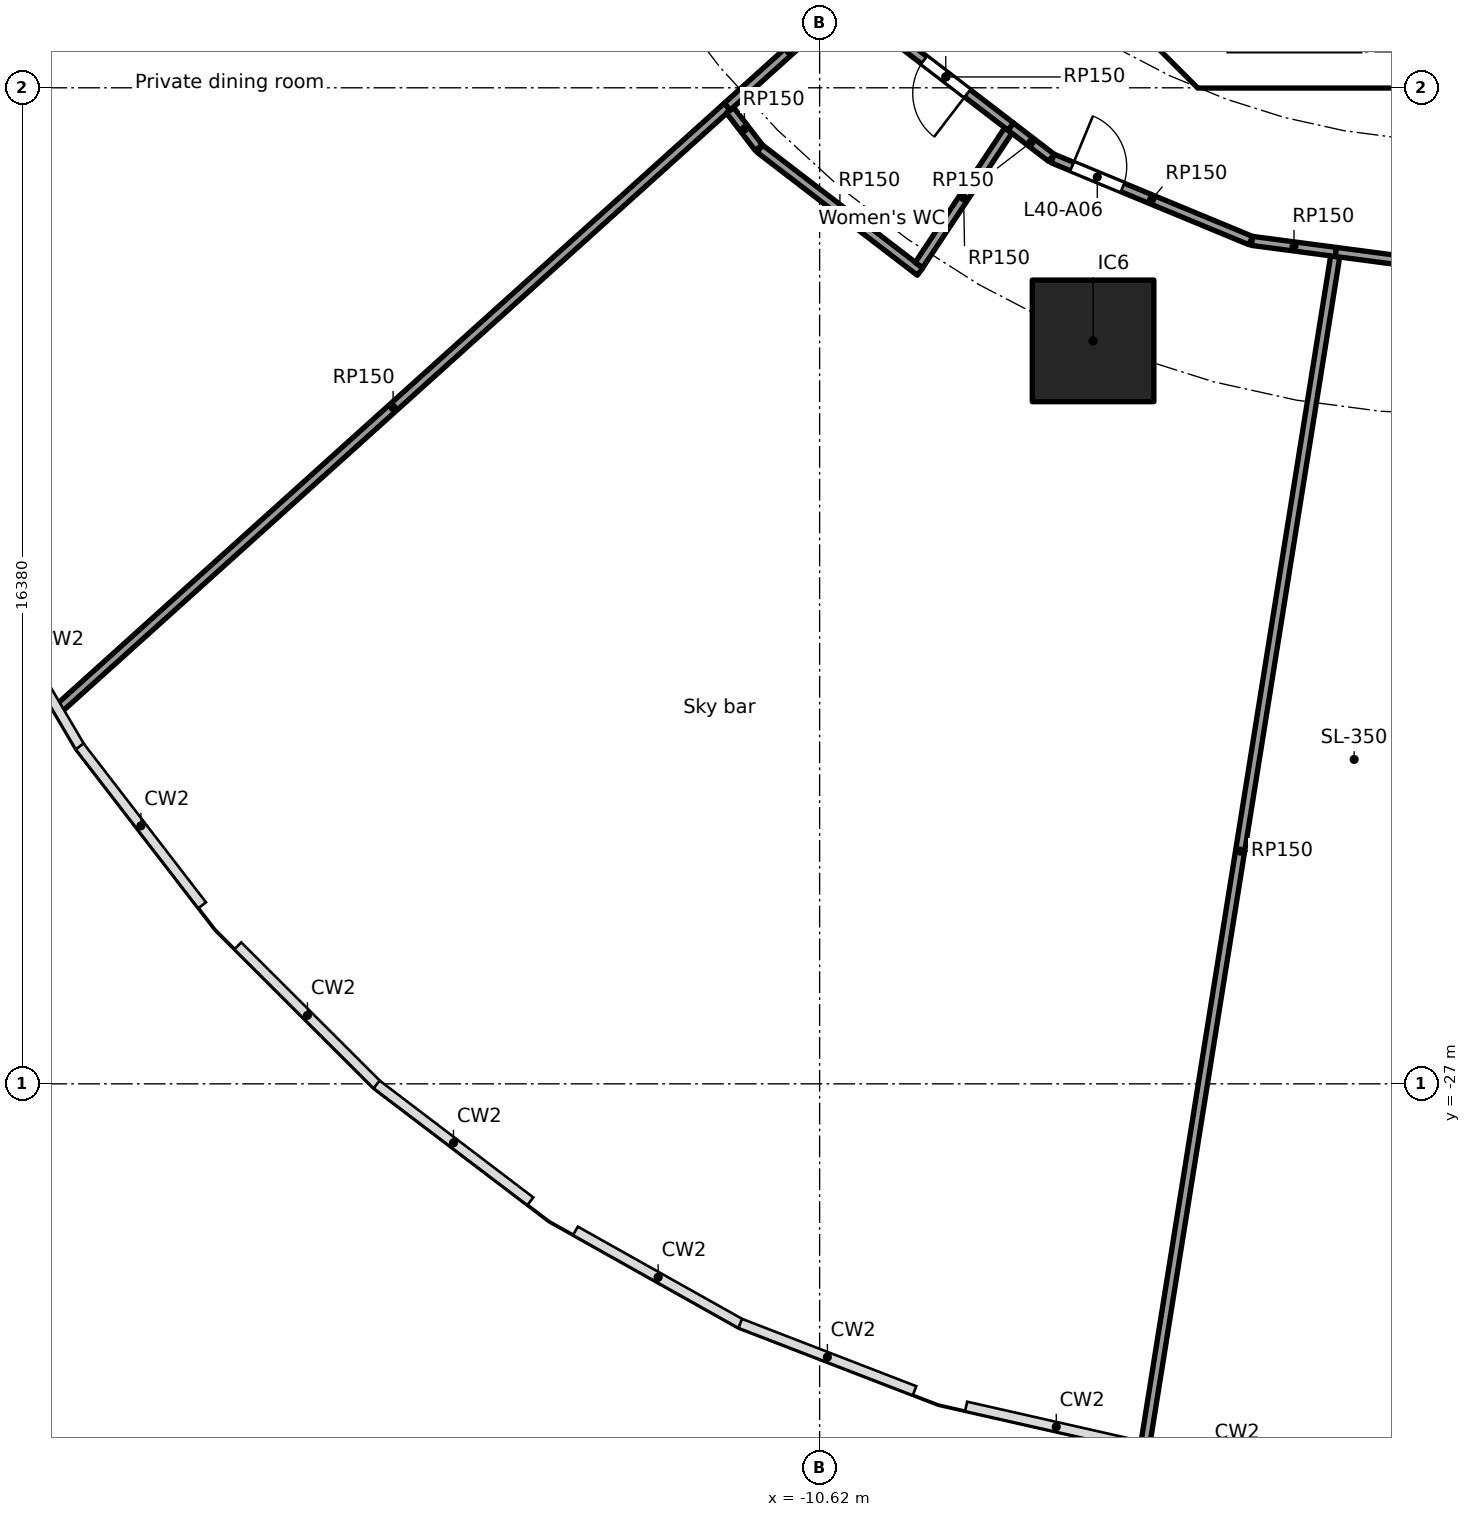
"""IFC4 building model, lengths in metres.
Left out: names, types, materials, properties, quantities, classifications, styles, units other than length and angle.
Written with IfcOpenShell. Run it as: python <this file> out.ifc"""

import sys

from ifc_helpers import new_model, si_unit, direction, frame, frame_2d, origin, origin_2d, place, context, subcontext, project, spatial, polyline, rectangle, outline, extrude, element, fill, save


model = new_model("IFC4")
c1 = context("Model", 3, precision=1e-05, world=origin(), true_north=direction((0.0, 1.0)))
c2 = subcontext(c1, "Body", "Model", "MODEL_VIEW")
j1 = project(units=[si_unit("LENGTHUNIT", "METRE"), si_unit("PLANEANGLEUNIT", "RADIAN")], contexts=[c1])
p1 = place(None, origin())
s1 = spatial("IfcSite", under=j1, at=p1, CompositionType="ELEMENT")
p2 = place(p1, origin())
s2 = spatial("IfcBuilding", under=s1, at=p2, CompositionType="ELEMENT")
p3 = place(p2, frame((0.0, 0.0, 160.3)))
s3 = spatial("IfcBuildingStorey", under=s2, at=p3, CompositionType="ELEMENT", Elevation=160.3)
p4 = place(p3, frame((-6.123, -14.782, 0.0), z_axis=(0.0, 0.0, 1.0), x_axis=(1.0, 0.0, 0.0)))
e1 = element("IfcColumn", 1, at=p4, inside=s3, PredefinedType="COLUMN", context=c2, shape_type="SweptSolid", body=[
    extrude(rectangle(XDim=2.0, YDim=2.0, at=origin_2d()), origin(), (0.0, 0.0, 1.0), 5.6),
])
p5 = place(p3, frame((-9.988, -4.613, 0.0), z_axis=(0.0, 0.0, 1.0), x_axis=(0.707106781187, -0.707106781187, 0.0)))
e2 = element("IfcWall", 2, at=p5, inside=s3, PredefinedType="SHEAR", context=c2, shape_type="SweptSolid", body=[
    extrude(rectangle(XDim=7.602, YDim=0.6, at=frame_2d((3.801, 0.0))), origin(), (0.0, 0.0, 1.0), 5.34),
])
p6 = place(p5, frame((6.151, 0.0, 0.0)))
e3 = element("IfcOpeningElement", 3, at=p6, cuts=e2, PredefinedType="OPENING", context=c2, shape_type="SweptSolid", body=[
    extrude(rectangle(XDim=1.1, YDim=2.1, at=frame_2d((0.55, 1.05))), frame((0.0, 0.31, 0.0), z_axis=(0.0, -1.0, 0.0), x_axis=(1.0, 0.0, 0.0)), (0.0, 0.0, 1.0), 0.62),
])
p7 = place(p3, origin())
e4 = element("IfcWall", 4, at=p7, inside=s3, PredefinedType="SHEAR", context=c2, shape_type="SweptSolid", body=[
    extrude(outline(polyline([(-4.152, -10.025), (4.152, -10.025), (4.401, -9.776), (4.825, -10.2), (4.401, -10.625), (-4.401, -10.625), (-4.825, -10.2), (-4.401, -9.776), (-4.152, -10.025)])), origin(), (0.0, 0.0, 1.0), 5.34),
])
p8 = place(p3, frame((-12.138, -10.93, 0.0), z_axis=(0.0, 0.0, 1.0), x_axis=(-0.743151323341, -0.66912338968, 0.0)))
e5 = element("IfcWall", 5, at=p8, inside=s3, PredefinedType="PARTITIONING", context=c2, shape_type="SweptSolid", body=[
    extrude(rectangle(XDim=14.791, YDim=0.15, at=frame_2d((7.396, 0.0))), origin(), (0.0, 0.0, 1.0), 5.34),
])
p9 = place(p3, frame((-11.621, -11.604, 0.0), z_axis=(0.0, 0.0, 1.0), x_axis=(-0.608781909099, 0.793337624945, 0.0)))
e6 = element("IfcWall", 6, at=p9, inside=s3, PredefinedType="PARTITIONING", context=c2, shape_type="SweptSolid", body=[
    extrude(rectangle(XDim=0.775, YDim=0.15, at=frame_2d((0.388, 0.0))), origin(), (0.0, 0.0, 1.0), 5.34),
])
p10 = place(p3, frame((-10.107, -9.101, 0.0), z_axis=(0.0, 0.0, 1.0), x_axis=(-0.743116473198, -0.669162093414, 0.0)))
e7 = element("IfcWall", 7, at=p10, inside=s3, PredefinedType="PARTITIONING", context=c2, shape_type="SweptSolid", body=[
    extrude(rectangle(XDim=2.733, YDim=0.15, at=frame_2d((1.367, 0.0))), origin(), (0.0, 0.0, 1.0), 5.34),
])
p11 = place(p3, frame((-8.968, -13.644, 0.0), z_axis=(0.0, 0.0, 1.0), x_axis=(-0.79334728927, 0.608769314772, 0.0)))
e8 = element("IfcWall", 8, at=p11, inside=s3, PredefinedType="PARTITIONING", context=c2, shape_type="SweptSolid", body=[
    extrude(rectangle(XDim=3.323, YDim=0.15, at=frame_2d((1.661, 0.0))), origin(), (0.0, 0.0, 1.0), 5.34),
])
p12 = place(p3, frame((-7.476, -11.26, 0.0), z_axis=(0.0, 0.0, 1.0), x_axis=(-0.793376684251, 0.60873100536, 0.0)))
e9 = element("IfcWall", 9, at=p12, inside=s3, PredefinedType="PARTITIONING", context=c2, shape_type="SweptSolid", body=[
    extrude(rectangle(XDim=2.687, YDim=0.15, at=frame_2d((1.343, 0.0))), origin(), (0.0, 0.0, 1.0), 5.34),
])
p13 = place(p12, frame((0.899, 0.0, 0.0)))
e10 = element("IfcOpeningElement", 10, at=p13, cuts=e9, PredefinedType="OPENING", context=c2, shape_type="SweptSolid", body=[
    extrude(rectangle(XDim=0.9, YDim=2.1, at=frame_2d((0.45, 1.05))), frame((0.0, 0.085, 0.0), z_axis=(0.0, -1.0, 0.0), x_axis=(1.0, 0.0, 0.0)), (0.0, 0.0, 1.0), 0.17),
])
p14 = place(p3, frame((-7.517, -11.322, 0.0), z_axis=(0.0, 0.0, 1.0), x_axis=(-0.553129626005, -0.833095202744, 0.0)))
e11 = element("IfcWall", 11, at=p14, inside=s3, PredefinedType="PARTITIONING", context=c2, shape_type="SweptSolid", body=[
    extrude(rectangle(XDim=2.656, YDim=0.15, at=frame_2d((1.328, 0.0))), origin(), (0.0, 0.0, 1.0), 5.34),
])
p15 = place(p3, frame((-6.809, -11.771, 0.0), z_axis=(0.0, 0.0, 1.0), x_axis=(-0.793358303575, 0.608754960677, 0.0)))
e12 = element("IfcWall", 12, at=p15, inside=s3, PredefinedType="PARTITIONING", context=c2, shape_type="SweptSolid", body=[
    extrude(rectangle(XDim=0.84, YDim=0.15, at=frame_2d((0.42, 0.0))), origin(), (0.0, 0.0, 1.0), 5.34),
])
p16 = place(p3, frame((-3.531, -13.132, 0.0), z_axis=(0.0, 0.0, 1.0), x_axis=(-0.923881838111, 0.382677866108, 0.0)))
e13 = element("IfcWall", 13, at=p16, inside=s3, PredefinedType="PARTITIONING", context=c2, shape_type="SweptSolid", body=[
    extrude(rectangle(XDim=3.527, YDim=0.15, at=frame_2d((1.763, 0.0))), origin(), (0.0, 0.0, 1.0), 5.34),
])
p17 = place(p16, frame((2.281, 0.0, 0.0)))
e14 = element("IfcOpeningElement", 14, at=p17, cuts=e13, PredefinedType="OPENING", context=c2, shape_type="SweptSolid", body=[
    extrude(rectangle(XDim=0.9, YDim=2.1, at=frame_2d((0.45, 1.05))), frame((0.0, 0.085, 0.0), z_axis=(0.0, -1.0, 0.0), x_axis=(1.0, 0.0, 0.0)), (0.0, 0.0, 1.0), 0.17),
])
p18 = place(p3, frame((-2.142, -13.394, 0.0), z_axis=(0.0, 0.0, 1.0), x_axis=(-0.157896749687, -0.987455627579, 0.0)))
e15 = element("IfcWall", 15, at=p18, inside=s3, PredefinedType="PARTITIONING", context=c2, shape_type="SweptSolid", body=[
    extrude(rectangle(XDim=19.805, YDim=0.15, at=frame_2d((9.903, 0.0))), origin(), (0.0, 0.0, 1.0), 5.34),
])
p19 = place(p3, frame((-2.13, -13.32, 0.0), z_axis=(0.0, 0.0, 1.0), x_axis=(-0.991448914516, 0.130495401857, 0.0)))
e16 = element("IfcWall", 16, at=p19, inside=s3, PredefinedType="PARTITIONING", context=c2, shape_type="SweptSolid", body=[
    extrude(rectangle(XDim=1.39, YDim=0.15, at=frame_2d((0.695, 0.0))), origin(), (0.0, 0.0, 1.0), 5.34),
])
p20 = place(p3, frame((-0.012, -13.598, 0.0), z_axis=(0.0, 0.0, 1.0), x_axis=(-0.991448071145, 0.130501809272, 0.0)))
e17 = element("IfcWall", 17, at=p20, inside=s3, PredefinedType="PARTITIONING", context=c2, shape_type="SweptSolid", body=[
    extrude(rectangle(XDim=2.136, YDim=0.15, at=frame_2d((1.068, 0.0))), origin(), (0.0, 0.0, 1.0), 5.34),
])
p21 = place(p13, origin())
e18 = element("IfcDoor", 18, at=p21, inside=s3, OperationType="SINGLE_SWING_LEFT", PredefinedType="DOOR", context=c2, shape_type="SweptSolid", body=[
    extrude(rectangle(XDim=0.9, YDim=2.1, at=frame_2d((0.45, 1.05))), frame((0.0, 0.025, 0.0), z_axis=(0.0, -1.0, 0.0), x_axis=(1.0, 0.0, 0.0)), (0.0, 0.0, 1.0), 0.05),
])
fill(e10, e18)
p22 = place(p17, frame((0.9, 0.0, 0.0), x_axis=(-1.0, 0.0, 0.0)))
e19 = element("IfcDoor", 19, at=p22, inside=s3, OperationType="SINGLE_SWING_LEFT", PredefinedType="DOOR", context=c2, shape_type="SweptSolid", body=[
    extrude(rectangle(XDim=0.9, YDim=2.1, at=frame_2d((0.45, 1.05))), frame((0.0, 0.025, 0.0), z_axis=(0.0, -1.0, 0.0), x_axis=(1.0, 0.0, 0.0)), (0.0, 0.0, 1.0), 0.05),
])
fill(e14, e19)
save(model, sys.argv[1])
